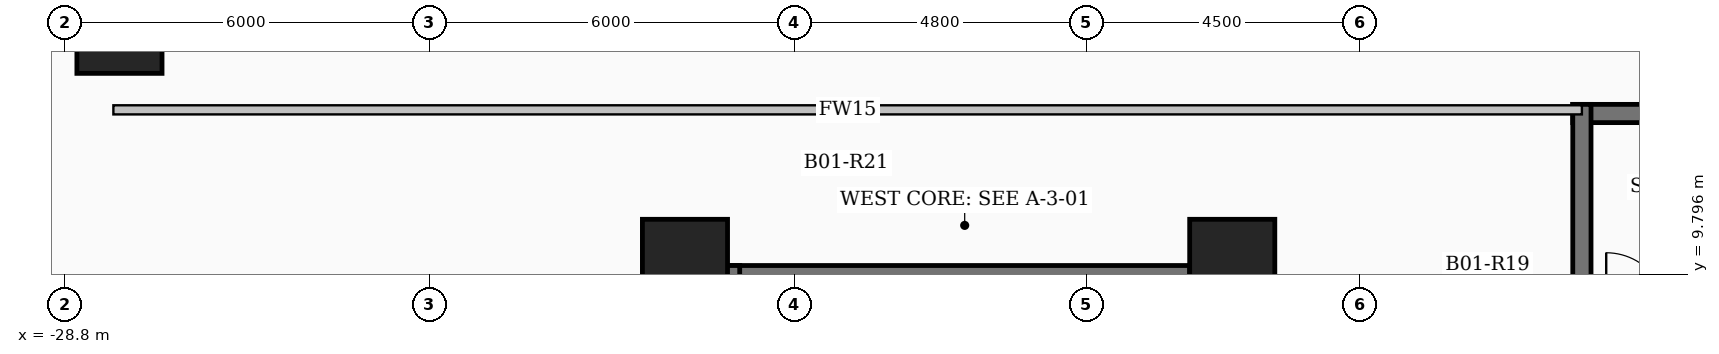
"""IFC4 building model, lengths in metres.
Left out: names, types, materials, properties, quantities, classifications, styles, units other than length and angle.
Written with IfcOpenShell. Run it as: python <this file> out.ifc"""

import sys

from ifc_helpers import new_model, si_unit, direction, frame, frame_2d, origin, origin_2d, place, context, subcontext, project, spatial, rectangle, extrude, element, save


model = new_model("IFC4")
c1 = context("Model", 3, precision=1e-05, world=origin(), true_north=direction((0.0, 1.0)))
c2 = subcontext(c1, "Body", "Model", "MODEL_VIEW")
j1 = project(units=[si_unit("LENGTHUNIT", "METRE"), si_unit("PLANEANGLEUNIT", "RADIAN")], contexts=[c1])
p1 = place(None, origin())
s1 = spatial("IfcSite", under=j1, at=p1, CompositionType="ELEMENT")
p2 = place(p1, origin())
s2 = spatial("IfcBuilding", under=s1, at=p2, CompositionType="ELEMENT")
p3 = place(p2, frame((0.0, 0.0, -4.6)))
s3 = spatial("IfcBuildingStorey", under=s2, at=p3, CompositionType="ELEMENT", Elevation=-4.6)
for number, where, z_axis, x_axis in (
    (1, (-9.6, 10.0, 0.0), (0.0, 0.0, 1.0), (1.0, 0.0, 0.0)),
    (2, (-18.6, 10.0, 0.0), (0.0, 0.0, 1.0), (1.0, 0.0, 0.0)),
    (3, (-27.9, 13.8, 0.0), (0.0, 0.0, 1.0), (1.0, 0.0, 0.0)),
):
    element("IfcColumn", number, at=place(p3, frame(where, z_axis=z_axis, x_axis=x_axis)), inside=s3, PredefinedType="COLUMN", context=c2, shape_type="SweptSolid", body=[
        extrude(rectangle(XDim=1.4, YDim=1.4, at=origin_2d()), origin(), (0.0, 0.0, 1.0), 4.6),
    ])
p4 = place(p3, frame((-18.0, 9.79, 0.0), z_axis=(0.0, 0.0, 1.0), x_axis=(1.0, 0.0, 0.0)))
e4 = element("IfcWall", 4, at=p4, inside=s3, PredefinedType="SHEAR", context=c2, shape_type="SweptSolid", body=[
    extrude(rectangle(XDim=8.0, YDim=0.3, at=frame_2d((4.0, 0.0))), origin(), (0.0, 0.0, 1.0), 4.6),
])
for number, where, z_axis, x_axis in (
    (5, (-17.85, 6.35, 0.0), (0.0, 0.0, 1.0), (0.0, 1.0, 0.0)),
    (6, (-10.15, 6.35, 0.0), (0.0, 0.0, 1.0), (0.0, 1.0, 0.0)),
):
    element("IfcWall", number, at=place(p3, frame(where, z_axis=z_axis, x_axis=x_axis)), inside=s3, PredefinedType="SHEAR", context=c2, shape_type="SweptSolid", body=[
        extrude(rectangle(XDim=3.59, YDim=0.3, at=frame_2d((1.795, 0.0))), origin(), (0.0, 0.0, 1.0), 4.6),
    ])
p5 = place(p3, frame((-4.0, 12.44, 0.0), z_axis=(0.0, 0.0, 1.0), x_axis=(1.0, 0.0, 0.0)))
e7 = element("IfcWall", 7, at=p5, inside=s3, PredefinedType="SHEAR", context=c2, shape_type="SweptSolid", body=[
    extrude(rectangle(XDim=8.0, YDim=0.3, at=frame_2d((4.0, 0.0))), origin(), (0.0, 0.0, 1.0), 4.6),
])
p6 = place(p3, frame((-3.85, 9.0, 0.0), z_axis=(0.0, 0.0, 1.0), x_axis=(0.0, 1.0, 0.0)))
e8 = element("IfcWall", 8, at=p6, inside=s3, PredefinedType="SHEAR", context=c2, shape_type="SweptSolid", body=[
    extrude(rectangle(XDim=3.59, YDim=0.3, at=frame_2d((1.795, 0.0))), origin(), (0.0, 0.0, 1.0), 4.6),
])
p7 = place(p3, frame((-28.0, 12.5, 0.0), z_axis=(0.0, 0.0, 1.0), x_axis=(1.0, 0.0, 0.0)))
e9 = element("IfcWall", 9, at=p7, inside=s3, PredefinedType="PARTITIONING", context=c2, shape_type="SweptSolid", body=[
    extrude(rectangle(XDim=24.15, YDim=0.15, at=frame_2d((12.075, 0.0))), origin(), (0.0, 0.0, 1.0), 4.3),
])
save(model, sys.argv[1])
